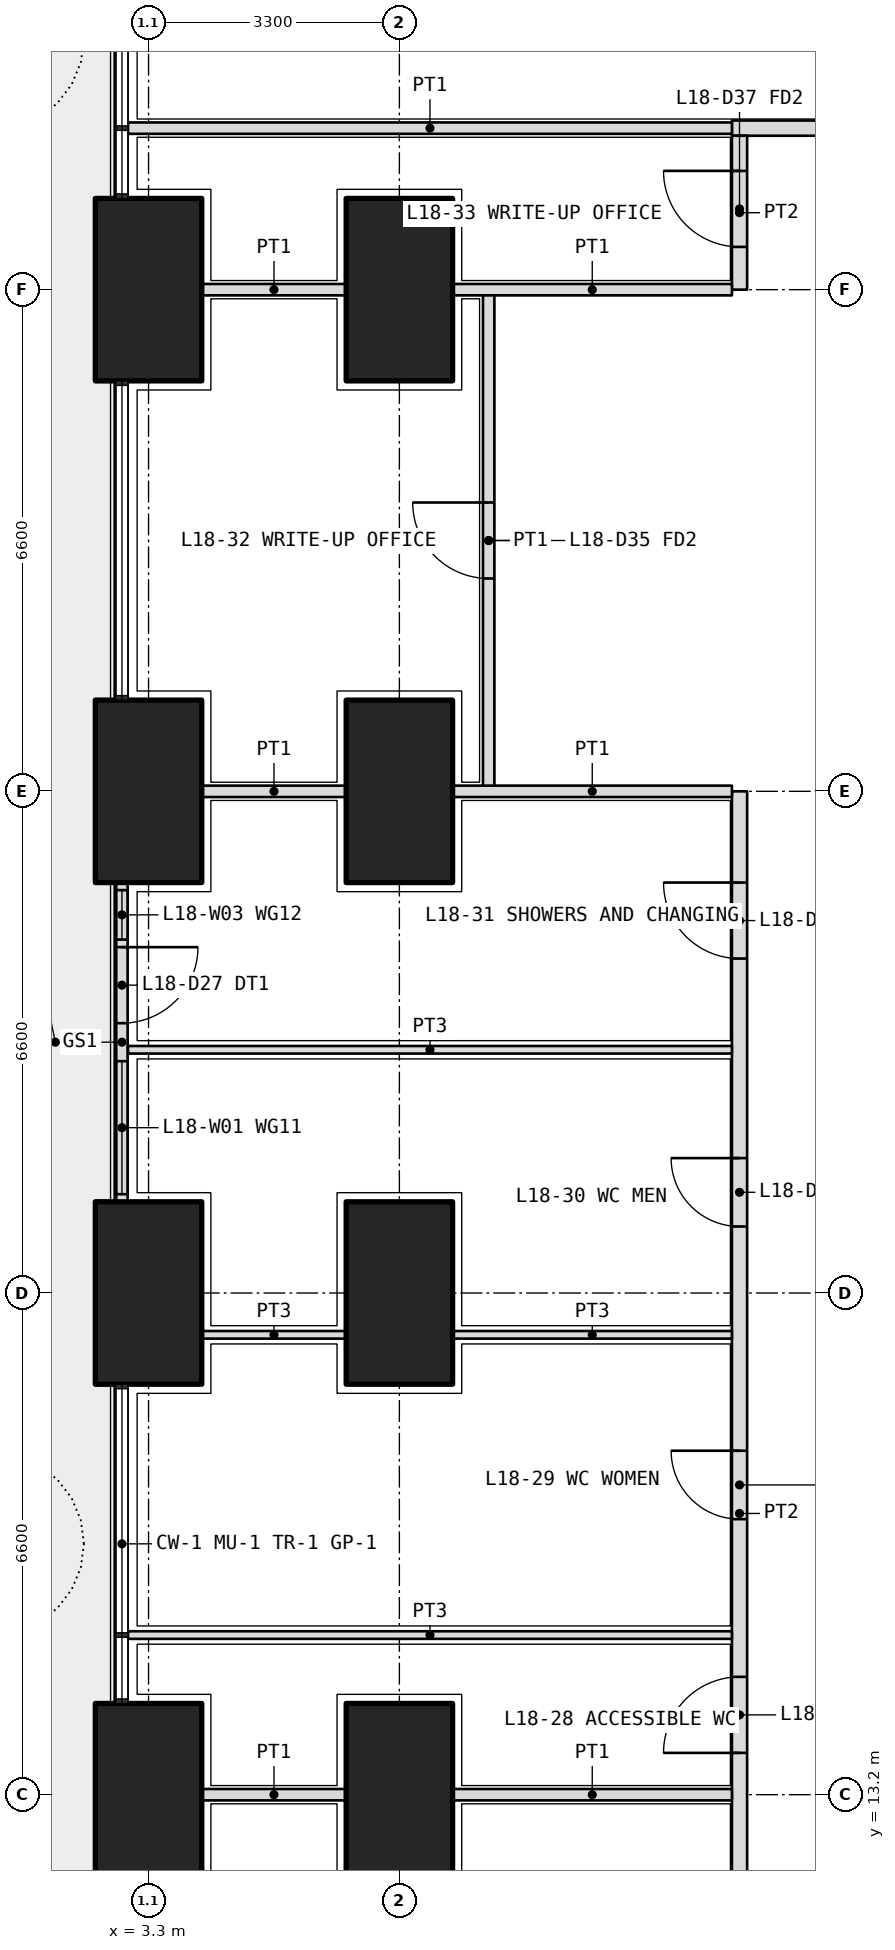
"""IFC4 building model, lengths in metres.
Left out: names, types, materials, properties, quantities, classifications, styles, units other than length and angle.
Written with IfcOpenShell. Run it as: python <this file> out.ifc"""

import sys

from ifc_helpers import new_model, si_unit, direction, frame, frame_2d, origin, origin_2d, place, context, subcontext, project, spatial, rectangle, extrude, element, fill, save


model = new_model("IFC4")
c1 = context("Model", 3, precision=1e-05, world=origin(), true_north=direction((0.0, 1.0)))
c2 = subcontext(c1, "Body", "Model", "MODEL_VIEW")
j1 = project(units=[si_unit("LENGTHUNIT", "METRE"), si_unit("PLANEANGLEUNIT", "RADIAN")], contexts=[c1])
p1 = place(None, origin())
s1 = spatial("IfcSite", under=j1, at=p1, CompositionType="ELEMENT")
p2 = place(p1, origin())
s2 = spatial("IfcBuilding", under=s1, at=p2, CompositionType="ELEMENT")
p3 = place(p2, frame((0.0, 0.0, 82.2)))
s3 = spatial("IfcBuildingStorey", under=s2, at=p3, CompositionType="ELEMENT", Elevation=82.2)
for number, where, z_axis, x_axis in (
    (1, (3.3, 13.2, 0.0), (0.0, 0.0, 1.0), (0.0, 1.0, 0.0)),
    (2, (3.3, 19.8, 0.0), (0.0, 0.0, 1.0), (0.0, 1.0, 0.0)),
    (3, (3.3, 26.4, 0.0), (0.0, 0.0, 1.0), (0.0, 1.0, 0.0)),
    (4, (3.3, 33.0, 0.0), (0.0, 0.0, 1.0), (0.0, 1.0, 0.0)),
    (5, (6.6, 13.2, 0.0), (0.0, 0.0, 1.0), (0.0, 1.0, 0.0)),
    (6, (6.6, 19.8, 0.0), (0.0, 0.0, 1.0), (0.0, 1.0, 0.0)),
    (7, (6.6, 26.4, 0.0), (0.0, 0.0, 1.0), (0.0, 1.0, 0.0)),
    (8, (6.6, 33.0, 0.0), (0.0, 0.0, 1.0), (0.0, 1.0, 0.0)),
):
    element("IfcColumn", number, at=place(p3, frame(where, z_axis=z_axis, x_axis=x_axis)), inside=s3, PredefinedType="COLUMN", context=c2, shape_type="SweptSolid", body=[
        extrude(rectangle(XDim=2.4, YDim=1.4, at=origin_2d()), origin(), (0.0, 0.0, 1.0), 4.2),
    ])
p4 = place(p3, frame((2.95, 25.2, 0.0), z_axis=(0.0, 0.0, 1.0), x_axis=(0.0, -1.0, 0.0)))
e9 = element("IfcWall", 9, at=p4, inside=s3, PredefinedType="SOLIDWALL", context=c2, shape_type="SweptSolid", body=[
    extrude(rectangle(XDim=4.2, YDim=0.15, at=frame_2d((2.1, 0.0))), origin(), (0.0, 0.0, 1.0), 2.7),
])
p5 = place(p4, frame((0.85, 0.0, 0.0)))
e10 = element("IfcOpeningElement", 10, at=p5, cuts=e9, PredefinedType="OPENING", context=c2, shape_type="SweptSolid", body=[
    extrude(rectangle(XDim=1.0, YDim=2.4, at=frame_2d((0.5, 1.2))), frame((0.0, 0.085, 0.0), z_axis=(0.0, -1.0, 0.0), x_axis=(1.0, 0.0, 0.0)), (0.0, 0.0, 1.0), 0.17),
])
p6 = place(p4, frame((0.1, 0.0, 0.1)))
e11 = element("IfcOpeningElement", 11, at=p6, cuts=e9, PredefinedType="OPENING", context=c2, shape_type="SweptSolid", body=[
    extrude(rectangle(XDim=0.65, YDim=2.3, at=frame_2d((0.325, 1.15))), frame((0.0, 0.085, 0.0), z_axis=(0.0, -1.0, 0.0), x_axis=(1.0, 0.0, 0.0)), (0.0, 0.0, 1.0), 0.17),
])
p7 = place(p4, frame((2.35, 0.0, 0.1)))
e12 = element("IfcOpeningElement", 12, at=p7, cuts=e9, PredefinedType="OPENING", context=c2, shape_type="SweptSolid", body=[
    extrude(rectangle(XDim=1.75, YDim=2.3, at=frame_2d((0.875, 1.15))), frame((0.0, 0.085, 0.0), z_axis=(0.0, -1.0, 0.0), x_axis=(1.0, 0.0, 0.0)), (0.0, 0.0, 1.0), 0.17),
])
p8 = place(p3, frame((10.975, 35.125, 0.0), z_axis=(0.0, 0.0, 1.0), x_axis=(1.0, 0.0, 0.0)))
e13 = element("IfcWall", 13, at=p8, inside=s3, PredefinedType="PARTITIONING", context=c2, shape_type="SweptSolid", body=[
    extrude(rectangle(XDim=30.85, YDim=0.2, at=frame_2d((15.425, 0.0))), origin(), (0.0, 0.0, 1.0), 2.85),
])
p9 = place(p8, frame((2.212, 0.0, 0.0)))
e14 = element("IfcOpeningElement", 14, at=p9, cuts=e13, PredefinedType="OPENING", context=c2, shape_type="SweptSolid", body=[
    extrude(rectangle(XDim=1.2, YDim=2.1, at=frame_2d((0.6, 1.05))), frame((0.0, 0.11, 0.0), z_axis=(0.0, -1.0, 0.0), x_axis=(1.0, 0.0, 0.0)), (0.0, 0.0, 1.0), 0.22),
])
p10 = place(p8, frame((8.225, 0.0, 0.0)))
e15 = element("IfcOpeningElement", 15, at=p10, cuts=e13, PredefinedType="OPENING", context=c2, shape_type="SweptSolid", body=[
    extrude(rectangle(XDim=1.2, YDim=2.1, at=frame_2d((0.6, 1.05))), frame((0.0, 0.11, 0.0), z_axis=(0.0, -1.0, 0.0), x_axis=(1.0, 0.0, 0.0)), (0.0, 0.0, 1.0), 0.22),
])
p11 = place(p8, frame((14.825, 0.0, 0.0)))
e16 = element("IfcOpeningElement", 16, at=p11, cuts=e13, PredefinedType="OPENING", context=c2, shape_type="SweptSolid", body=[
    extrude(rectangle(XDim=1.2, YDim=2.1, at=frame_2d((0.6, 1.05))), frame((0.0, 0.11, 0.0), z_axis=(0.0, -1.0, 0.0), x_axis=(1.0, 0.0, 0.0)), (0.0, 0.0, 1.0), 0.22),
])
p12 = place(p8, frame((19.775, 0.0, 0.0)))
e17 = element("IfcOpeningElement", 17, at=p12, cuts=e13, PredefinedType="OPENING", context=c2, shape_type="SweptSolid", body=[
    extrude(rectangle(XDim=1.2, YDim=2.1, at=frame_2d((0.6, 1.05))), frame((0.0, 0.11, 0.0), z_axis=(0.0, -1.0, 0.0), x_axis=(1.0, 0.0, 0.0)), (0.0, 0.0, 1.0), 0.22),
])
p13 = place(p8, frame((25.788, 0.0, 0.0)))
e18 = element("IfcOpeningElement", 18, at=p13, cuts=e13, PredefinedType="OPENING", context=c2, shape_type="SweptSolid", body=[
    extrude(rectangle(XDim=1.2, YDim=2.1, at=frame_2d((0.6, 1.05))), frame((0.0, 0.11, 0.0), z_axis=(0.0, -1.0, 0.0), x_axis=(1.0, 0.0, 0.0)), (0.0, 0.0, 1.0), 0.22),
])
p14 = place(p3, frame((11.075, 7.4, 0.0), z_axis=(0.0, 0.0, 1.0), x_axis=(0.0, 1.0, 0.0)))
e19 = element("IfcWall", 19, at=p14, inside=s3, PredefinedType="PARTITIONING", context=c2, shape_type="SweptSolid", body=[
    extrude(rectangle(XDim=19.0, YDim=0.2, at=frame_2d((9.5, 0.0))), origin(), (0.0, 0.0, 1.0), 2.85),
])
p15 = place(p14, frame((2.35, 0.0, 0.0)))
e20 = element("IfcOpeningElement", 20, at=p15, cuts=e19, PredefinedType="OPENING", context=c2, shape_type="SweptSolid", body=[
    extrude(rectangle(XDim=1.0, YDim=2.1, at=frame_2d((0.5, 1.05))), frame((0.0, 0.11, 0.0), z_axis=(0.0, -1.0, 0.0), x_axis=(1.0, 0.0, 0.0)), (0.0, 0.0, 1.0), 0.22),
])
p16 = place(p14, frame((6.35, 0.0, 0.0)))
e21 = element("IfcOpeningElement", 21, at=p16, cuts=e19, PredefinedType="OPENING", context=c2, shape_type="SweptSolid", body=[
    extrude(rectangle(XDim=1.0, YDim=2.1, at=frame_2d((0.5, 1.05))), frame((0.0, 0.11, 0.0), z_axis=(0.0, -1.0, 0.0), x_axis=(1.0, 0.0, 0.0)), (0.0, 0.0, 1.0), 0.22),
])
p17 = place(p14, frame((9.425, 0.0, 0.0)))
e22 = element("IfcOpeningElement", 22, at=p17, cuts=e19, PredefinedType="OPENING", context=c2, shape_type="SweptSolid", body=[
    extrude(rectangle(XDim=0.9, YDim=2.1, at=frame_2d((0.45, 1.05))), frame((0.0, 0.11, 0.0), z_axis=(0.0, -1.0, 0.0), x_axis=(1.0, 0.0, 0.0)), (0.0, 0.0, 1.0), 0.22),
])
p18 = place(p14, frame((13.275, 0.0, 0.0)))
e23 = element("IfcOpeningElement", 23, at=p18, cuts=e19, PredefinedType="OPENING", context=c2, shape_type="SweptSolid", body=[
    extrude(rectangle(XDim=0.9, YDim=2.1, at=frame_2d((0.45, 1.05))), frame((0.0, 0.11, 0.0), z_axis=(0.0, -1.0, 0.0), x_axis=(1.0, 0.0, 0.0)), (0.0, 0.0, 1.0), 0.22),
])
p19 = place(p14, frame((16.8, 0.0, 0.0)))
e24 = element("IfcOpeningElement", 24, at=p19, cuts=e19, PredefinedType="OPENING", context=c2, shape_type="SweptSolid", body=[
    extrude(rectangle(XDim=1.0, YDim=2.1, at=frame_2d((0.5, 1.05))), frame((0.0, 0.11, 0.0), z_axis=(0.0, -1.0, 0.0), x_axis=(1.0, 0.0, 0.0)), (0.0, 0.0, 1.0), 0.22),
])
p20 = place(p3, frame((11.075, 33.0, 0.0), z_axis=(0.0, 0.0, 1.0), x_axis=(0.0, 1.0, 0.0)))
e25 = element("IfcWall", 25, at=p20, inside=s3, PredefinedType="PARTITIONING", context=c2, shape_type="SweptSolid", body=[
    extrude(rectangle(XDim=2.025, YDim=0.2, at=frame_2d((1.012, 0.0))), origin(), (0.0, 0.0, 1.0), 2.85),
])
p21 = place(p20, frame((0.562, 0.0, 0.0)))
e26 = element("IfcOpeningElement", 26, at=p21, cuts=e25, PredefinedType="OPENING", context=c2, shape_type="SweptSolid", body=[
    extrude(rectangle(XDim=1.0, YDim=2.1, at=frame_2d((0.5, 1.05))), frame((0.0, 0.11, 0.0), z_axis=(0.0, -1.0, 0.0), x_axis=(1.0, 0.0, 0.0)), (0.0, 0.0, 1.0), 0.22),
])
p22 = place(p3, frame((3.03, 35.125, 0.0), z_axis=(0.0, 0.0, 1.0), x_axis=(1.0, 0.0, 0.0)))
e27 = element("IfcWall", 27, at=p22, inside=s3, PredefinedType="PARTITIONING", context=c2, shape_type="SweptSolid", body=[
    extrude(rectangle(XDim=7.945, YDim=0.15, at=frame_2d((3.973, 0.0))), origin(), (0.0, 0.0, 1.0), 2.7),
])
p23 = place(p3, frame((3.03, 15.3, 0.0), z_axis=(0.0, 0.0, 1.0), x_axis=(1.0, 0.0, 0.0)))
e28 = element("IfcWall", 28, at=p23, inside=s3, PredefinedType="PARTITIONING", context=c2, shape_type="SweptSolid", body=[
    extrude(rectangle(XDim=7.945, YDim=0.1, at=frame_2d((3.973, 0.0))), origin(), (0.0, 0.0, 1.0), 2.7),
])
p24 = place(p3, frame((4.0, 19.25, 0.0), z_axis=(0.0, 0.0, 1.0), x_axis=(1.0, 0.0, 0.0)))
e29 = element("IfcWall", 29, at=p24, inside=s3, PredefinedType="PARTITIONING", context=c2, shape_type="SweptSolid", body=[
    extrude(rectangle(XDim=1.9, YDim=0.1, at=frame_2d((0.95, 0.0))), origin(), (0.0, 0.0, 1.0), 2.85),
])
p25 = place(p3, frame((7.3, 19.25, 0.0), z_axis=(0.0, 0.0, 1.0), x_axis=(1.0, 0.0, 0.0)))
e30 = element("IfcWall", 30, at=p25, inside=s3, PredefinedType="PARTITIONING", context=c2, shape_type="SweptSolid", body=[
    extrude(rectangle(XDim=3.675, YDim=0.1, at=frame_2d((1.837, 0.0))), origin(), (0.0, 0.0, 1.0), 2.85),
])
p26 = place(p3, frame((3.03, 23.0, 0.0), z_axis=(0.0, 0.0, 1.0), x_axis=(1.0, 0.0, 0.0)))
e31 = element("IfcWall", 31, at=p26, inside=s3, PredefinedType="PARTITIONING", context=c2, shape_type="SweptSolid", body=[
    extrude(rectangle(XDim=7.945, YDim=0.1, at=frame_2d((3.973, 0.0))), origin(), (0.0, 0.0, 1.0), 2.7),
])
p27 = place(p3, frame((7.775, 26.4, 0.0), z_axis=(0.0, 0.0, 1.0), x_axis=(0.0, 1.0, 0.0)))
e32 = element("IfcWall", 32, at=p27, inside=s3, PredefinedType="PARTITIONING", context=c2, shape_type="SweptSolid", body=[
    extrude(rectangle(XDim=6.6, YDim=0.15, at=frame_2d((3.3, 0.0))), origin(), (0.0, 0.0, 1.0), 2.85),
])
p28 = place(p27, frame((2.8, 0.0, 0.0)))
e33 = element("IfcOpeningElement", 33, at=p28, cuts=e32, PredefinedType="OPENING", context=c2, shape_type="SweptSolid", body=[
    extrude(rectangle(XDim=1.0, YDim=2.1, at=frame_2d((0.5, 1.05))), frame((0.0, 0.085, 0.0), z_axis=(0.0, -1.0, 0.0), x_axis=(1.0, 0.0, 0.0)), (0.0, 0.0, 1.0), 0.17),
])
p29 = place(p3, frame((4.0, 13.2, 0.0), z_axis=(0.0, 0.0, 1.0), x_axis=(1.0, 0.0, 0.0)))
e34 = element("IfcWall", 34, at=p29, inside=s3, PredefinedType="PARTITIONING", context=c2, shape_type="SweptSolid", body=[
    extrude(rectangle(XDim=1.9, YDim=0.15, at=frame_2d((0.95, 0.0))), origin(), (0.0, 0.0, 1.0), 2.85),
])
p30 = place(p3, frame((7.3, 13.2, 0.0), z_axis=(0.0, 0.0, 1.0), x_axis=(1.0, 0.0, 0.0)))
e35 = element("IfcWall", 35, at=p30, inside=s3, PredefinedType="PARTITIONING", context=c2, shape_type="SweptSolid", body=[
    extrude(rectangle(XDim=3.675, YDim=0.15, at=frame_2d((1.837, 0.0))), origin(), (0.0, 0.0, 1.0), 2.85),
])
p31 = place(p3, frame((4.0, 26.4, 0.0), z_axis=(0.0, 0.0, 1.0), x_axis=(1.0, 0.0, 0.0)))
e36 = element("IfcWall", 36, at=p31, inside=s3, PredefinedType="PARTITIONING", context=c2, shape_type="SweptSolid", body=[
    extrude(rectangle(XDim=1.9, YDim=0.15, at=frame_2d((0.95, 0.0))), origin(), (0.0, 0.0, 1.0), 2.85),
])
p32 = place(p3, frame((7.3, 26.4, 0.0), z_axis=(0.0, 0.0, 1.0), x_axis=(1.0, 0.0, 0.0)))
e37 = element("IfcWall", 37, at=p32, inside=s3, PredefinedType="PARTITIONING", context=c2, shape_type="SweptSolid", body=[
    extrude(rectangle(XDim=3.675, YDim=0.15, at=frame_2d((1.837, 0.0))), origin(), (0.0, 0.0, 1.0), 2.85),
])
p33 = place(p3, frame((4.0, 33.0, 0.0), z_axis=(0.0, 0.0, 1.0), x_axis=(1.0, 0.0, 0.0)))
e38 = element("IfcWall", 38, at=p33, inside=s3, PredefinedType="PARTITIONING", context=c2, shape_type="SweptSolid", body=[
    extrude(rectangle(XDim=1.9, YDim=0.15, at=frame_2d((0.95, 0.0))), origin(), (0.0, 0.0, 1.0), 2.85),
])
p34 = place(p3, frame((7.3, 33.0, 0.0), z_axis=(0.0, 0.0, 1.0), x_axis=(1.0, 0.0, 0.0)))
e39 = element("IfcWall", 39, at=p34, inside=s3, PredefinedType="PARTITIONING", context=c2, shape_type="SweptSolid", body=[
    extrude(rectangle(XDim=3.675, YDim=0.15, at=frame_2d((1.837, 0.0))), origin(), (0.0, 0.0, 1.0), 2.85),
])
p35 = place(p5, origin())
e40 = element("IfcDoor", 40, at=p35, inside=s3, OperationType="SINGLE_SWING_LEFT", PredefinedType="DOOR", context=c2, shape_type="SweptSolid", body=[
    extrude(rectangle(XDim=1.0, YDim=2.4, at=frame_2d((0.5, 1.2))), frame((0.0, 0.025, 0.0), z_axis=(0.0, -1.0, 0.0), x_axis=(1.0, 0.0, 0.0)), (0.0, 0.0, 1.0), 0.05),
])
fill(e10, e40)
p36 = place(p6, origin())
e41 = element("IfcWindow", 41, at=p36, inside=s3, PartitioningType="SINGLE_PANEL", PredefinedType="WINDOW", context=c2, shape_type="SweptSolid", body=[
    extrude(rectangle(XDim=0.65, YDim=2.3, at=frame_2d((0.325, 1.15))), frame((0.0, 0.03, 0.0), z_axis=(0.0, -1.0, 0.0), x_axis=(1.0, 0.0, 0.0)), (0.0, 0.0, 1.0), 0.06),
])
fill(e11, e41)
p37 = place(p7, origin())
e42 = element("IfcWindow", 42, at=p37, inside=s3, PartitioningType="SINGLE_PANEL", PredefinedType="WINDOW", context=c2, shape_type="SweptSolid", body=[
    extrude(rectangle(XDim=1.75, YDim=2.3, at=frame_2d((0.875, 1.15))), frame((0.0, 0.03, 0.0), z_axis=(0.0, -1.0, 0.0), x_axis=(1.0, 0.0, 0.0)), (0.0, 0.0, 1.0), 0.06),
])
fill(e12, e42)
p38 = place(p16, origin())
e43 = element("IfcDoor", 43, at=p38, inside=s3, OperationType="SINGLE_SWING_LEFT", PredefinedType="DOOR", context=c2, shape_type="SweptSolid", body=[
    extrude(rectangle(XDim=1.0, YDim=2.1, at=frame_2d((0.5, 1.05))), frame((0.0, 0.025, 0.0), z_axis=(0.0, -1.0, 0.0), x_axis=(1.0, 0.0, 0.0)), (0.0, 0.0, 1.0), 0.05),
])
fill(e21, e43)
p39 = place(p17, origin())
e44 = element("IfcDoor", 44, at=p39, inside=s3, OperationType="SINGLE_SWING_RIGHT", PredefinedType="DOOR", context=c2, shape_type="SweptSolid", body=[
    extrude(rectangle(XDim=0.9, YDim=2.1, at=frame_2d((0.45, 1.05))), frame((0.0, 0.025, 0.0), z_axis=(0.0, -1.0, 0.0), x_axis=(1.0, 0.0, 0.0)), (0.0, 0.0, 1.0), 0.05),
])
fill(e22, e44)
p40 = place(p18, origin())
e45 = element("IfcDoor", 45, at=p40, inside=s3, OperationType="SINGLE_SWING_RIGHT", PredefinedType="DOOR", context=c2, shape_type="SweptSolid", body=[
    extrude(rectangle(XDim=0.9, YDim=2.1, at=frame_2d((0.45, 1.05))), frame((0.0, 0.025, 0.0), z_axis=(0.0, -1.0, 0.0), x_axis=(1.0, 0.0, 0.0)), (0.0, 0.0, 1.0), 0.05),
])
fill(e23, e45)
p41 = place(p19, origin())
e46 = element("IfcDoor", 46, at=p41, inside=s3, OperationType="SINGLE_SWING_RIGHT", PredefinedType="DOOR", context=c2, shape_type="SweptSolid", body=[
    extrude(rectangle(XDim=1.0, YDim=2.1, at=frame_2d((0.5, 1.05))), frame((0.0, 0.025, 0.0), z_axis=(0.0, -1.0, 0.0), x_axis=(1.0, 0.0, 0.0)), (0.0, 0.0, 1.0), 0.05),
])
fill(e24, e46)
p42 = place(p28, origin())
e47 = element("IfcDoor", 47, at=p42, inside=s3, OperationType="SINGLE_SWING_RIGHT", PredefinedType="DOOR", context=c2, shape_type="SweptSolid", body=[
    extrude(rectangle(XDim=1.0, YDim=2.1, at=frame_2d((0.5, 1.05))), frame((0.0, 0.025, 0.0), z_axis=(0.0, -1.0, 0.0), x_axis=(1.0, 0.0, 0.0)), (0.0, 0.0, 1.0), 0.05),
])
fill(e33, e47)
p43 = place(p21, origin())
e48 = element("IfcDoor", 48, at=p43, inside=s3, OperationType="SINGLE_SWING_RIGHT", PredefinedType="DOOR", context=c2, shape_type="SweptSolid", body=[
    extrude(rectangle(XDim=1.0, YDim=2.1, at=frame_2d((0.5, 1.05))), frame((0.0, 0.025, 0.0), z_axis=(0.0, -1.0, 0.0), x_axis=(1.0, 0.0, 0.0)), (0.0, 0.0, 1.0), 0.05),
])
fill(e26, e48)
save(model, sys.argv[1])
